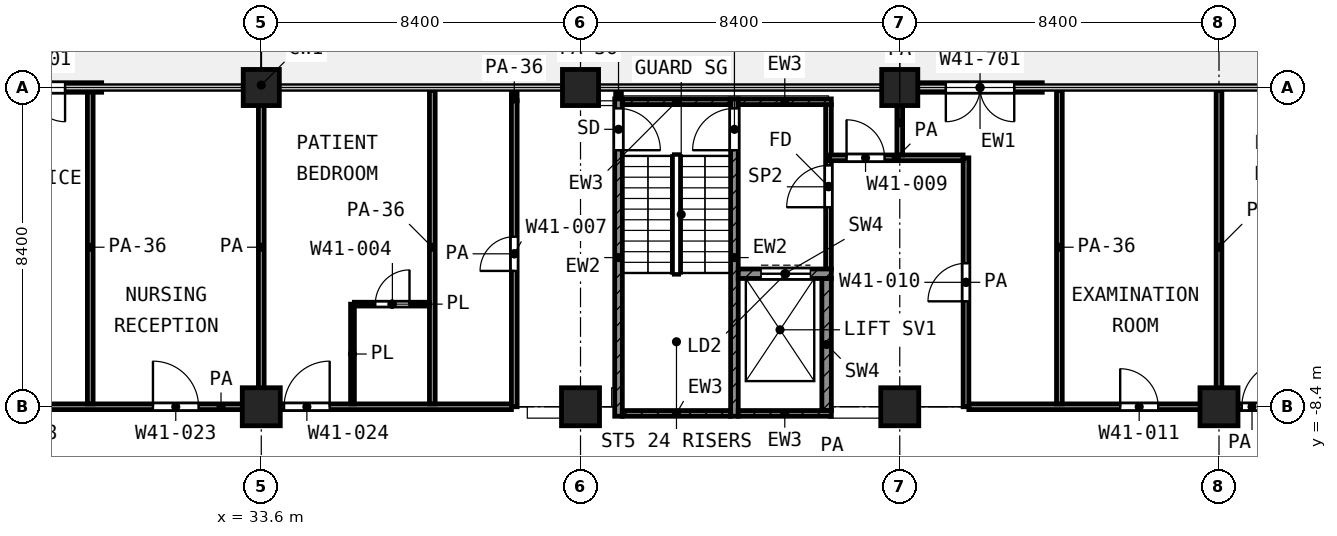
"""IFC4 building model, lengths in metres.
Left out: names, types, materials, properties, quantities, classifications, styles, units other than length and angle.
Written with IfcOpenShell. Run it as: python <this file> out.ifc"""

import sys

from ifc_helpers import new_model, si_unit, direction, frame, frame_2d, origin, origin_2d, place, context, subcontext, project, spatial, rectangle, extrude, element, fill, save


model = new_model("IFC4")
c1 = context("Model", 3, precision=1e-05, world=origin(), true_north=direction((0.0, 1.0)))
c2 = subcontext(c1, "Body", "Model", "MODEL_VIEW")
j1 = project(units=[si_unit("LENGTHUNIT", "METRE"), si_unit("PLANEANGLEUNIT", "RADIAN")], contexts=[c1])
p1 = place(None, origin())
s1 = spatial("IfcSite", under=j1, at=p1, CompositionType="ELEMENT")
p2 = place(p1, origin())
s2 = spatial("IfcBuilding", under=s1, at=p2, CompositionType="ELEMENT")
p3 = place(p2, frame((0.0, 0.0, 200.4)))
s3 = spatial("IfcBuildingStorey", under=s2, at=p3, CompositionType="ELEMENT", Elevation=200.4)
for number, where, z_axis, x_axis in (
    (1, (33.6, 0.0, 0.0), (0.0, 0.0, 1.0), (1.0, 0.0, 0.0)),
    (2, (42.0, 0.0, 0.0), (0.0, 0.0, 1.0), (1.0, 0.0, 0.0)),
    (3, (50.4, 0.0, 0.0), (0.0, 0.0, 1.0), (1.0, 0.0, 0.0)),
):
    element("IfcColumn", number, at=place(p3, frame(where, z_axis=z_axis, x_axis=x_axis)), inside=s3, PredefinedType="COLUMN", context=c2, shape_type="SweptSolid", body=[
        extrude(rectangle(XDim=0.95, YDim=0.95, at=origin_2d()), origin(), (0.0, 0.0, 1.0), 4.2),
    ])
for number, where, z_axis, x_axis in (
    (4, (33.6, -8.4, 0.0), (0.0, 0.0, 1.0), (1.0, 0.0, 0.0)),
    (5, (42.0, -8.4, 0.0), (0.0, 0.0, 1.0), (1.0, 0.0, 0.0)),
    (6, (50.4, -8.4, 0.0), (0.0, 0.0, 1.0), (1.0, 0.0, 0.0)),
    (7, (58.8, -8.4, 0.0), (0.0, 0.0, 1.0), (1.0, 0.0, 0.0)),
):
    element("IfcColumn", number, at=place(p3, frame(where, z_axis=z_axis, x_axis=x_axis)), inside=s3, PredefinedType="COLUMN", context=c2, shape_type="SweptSolid", body=[
        extrude(rectangle(XDim=1.0, YDim=1.0, at=origin_2d()), origin(), (0.0, 0.0, 1.0), 4.2),
    ])
p4 = place(p3, frame((54.15, 0.0, 0.0), z_axis=(0.0, 0.0, 1.0), x_axis=(-1.0, 0.0, 0.0)))
e8 = element("IfcWall", 8, at=p4, inside=s3, PredefinedType="SOLIDWALL", context=c2, shape_type="SweptSolid", body=[
    extrude(rectangle(XDim=3.275, YDim=0.25, at=frame_2d((1.637, 0.0))), origin(), (0.0, 0.0, 1.0), 2.58),
])
p5 = place(p4, frame((0.738, 0.0, 0.0)))
e9 = element("IfcOpeningElement", 9, at=p5, cuts=e8, PredefinedType="OPENING", context=c2, shape_type="SweptSolid", body=[
    extrude(rectangle(XDim=1.8, YDim=2.1, at=frame_2d((0.9, 1.05))), frame((0.0, 0.135, 0.0), z_axis=(0.0, -1.0, 0.0), x_axis=(1.0, 0.0, 0.0)), (0.0, 0.0, 1.0), 0.27),
])
p6 = place(p3, frame((29.4, 0.0, 0.0), z_axis=(0.0, 0.0, 1.0), x_axis=(-1.0, 0.0, 0.0)))
e10 = element("IfcWall", 10, at=p6, inside=s3, PredefinedType="SOLIDWALL", context=c2, shape_type="SweptSolid", body=[
    extrude(rectangle(XDim=3.725, YDim=0.25, at=frame_2d((1.862, 0.0))), origin(), (0.0, 0.0, 1.0), 2.58),
])
p7 = place(p6, frame((0.962, 0.0, 0.0)))
e11 = element("IfcOpeningElement", 11, at=p7, cuts=e10, PredefinedType="OPENING", context=c2, shape_type="SweptSolid", body=[
    extrude(rectangle(XDim=1.8, YDim=2.1, at=frame_2d((0.9, 1.05))), frame((0.0, 0.135, 0.0), z_axis=(0.0, -1.0, 0.0), x_axis=(1.0, 0.0, 0.0)), (0.0, 0.0, 1.0), 0.27),
])
p8 = place(p3, frame((43.0, -8.65, 0.0), z_axis=(0.0, 0.0, 1.0), x_axis=(0.0, 1.0, 0.0)))
e12 = element("IfcWall", 12, at=p8, inside=s3, PredefinedType="SHEAR", context=c2, shape_type="SweptSolid", body=[
    extrude(rectangle(XDim=8.35, YDim=0.2, at=frame_2d((4.175, 0.0))), origin(), (0.0, 0.0, 1.0), 3.6),
])
p9 = place(p8, frame((7.0, 0.0, 0.0)))
e13 = element("IfcOpeningElement", 13, at=p9, cuts=e12, PredefinedType="OPENING", context=c2, shape_type="SweptSolid", body=[
    extrude(rectangle(XDim=1.1, YDim=2.1, at=frame_2d((0.55, 1.05))), frame((0.0, 0.11, 0.0), z_axis=(0.0, -1.0, 0.0), x_axis=(1.0, 0.0, 0.0)), (0.0, 0.0, 1.0), 0.22),
])
p10 = place(p3, frame((46.05, -8.65, 0.0), z_axis=(0.0, 0.0, 1.0), x_axis=(0.0, 1.0, 0.0)))
e14 = element("IfcWall", 14, at=p10, inside=s3, PredefinedType="SHEAR", context=c2, shape_type="SweptSolid", body=[
    extrude(rectangle(XDim=8.35, YDim=0.2, at=frame_2d((4.175, 0.0))), origin(), (0.0, 0.0, 1.0), 3.6),
])
p11 = place(p10, frame((7.0, 0.0, 0.0)))
e15 = element("IfcOpeningElement", 15, at=p11, cuts=e14, PredefinedType="OPENING", context=c2, shape_type="SweptSolid", body=[
    extrude(rectangle(XDim=1.1, YDim=2.1, at=frame_2d((0.55, 1.05))), frame((0.0, 0.11, 0.0), z_axis=(0.0, -1.0, 0.0), x_axis=(1.0, 0.0, 0.0)), (0.0, 0.0, 1.0), 0.22),
])
p12 = place(p3, frame((43.1, -0.375, 0.0), z_axis=(0.0, 0.0, 1.0), x_axis=(1.0, 0.0, 0.0)))
e16 = element("IfcWall", 16, at=p12, inside=s3, PredefinedType="SHEAR", context=c2, shape_type="SweptSolid", body=[
    extrude(rectangle(XDim=2.85, YDim=0.15, at=frame_2d((1.425, 0.0))), origin(), (0.0, 0.0, 1.0), 3.6),
])
p13 = place(p3, frame((46.15, -0.375, 0.0), z_axis=(0.0, 0.0, 1.0), x_axis=(1.0, 0.0, 0.0)))
e17 = element("IfcWall", 17, at=p13, inside=s3, PredefinedType="SHEAR", context=c2, shape_type="SweptSolid", body=[
    extrude(rectangle(XDim=2.45, YDim=0.15, at=frame_2d((1.225, 0.0))), origin(), (0.0, 0.0, 1.0), 3.6),
])
p14 = place(p3, frame((43.1, -8.575, 0.0), z_axis=(0.0, 0.0, 1.0), x_axis=(1.0, 0.0, 0.0)))
e18 = element("IfcWall", 18, at=p14, inside=s3, PredefinedType="SHEAR", context=c2, shape_type="SweptSolid", body=[
    extrude(rectangle(XDim=2.85, YDim=0.15, at=frame_2d((1.425, 0.0))), origin(), (0.0, 0.0, 1.0), 3.6),
])
p15 = place(p3, frame((46.15, -8.575, 0.0), z_axis=(0.0, 0.0, 1.0), x_axis=(1.0, 0.0, 0.0)))
e19 = element("IfcWall", 19, at=p15, inside=s3, PredefinedType="SHEAR", context=c2, shape_type="SweptSolid", body=[
    extrude(rectangle(XDim=2.45, YDim=0.15, at=frame_2d((1.225, 0.0))), origin(), (0.0, 0.0, 1.0), 3.6),
])
p16 = place(p3, frame((46.15, -4.9, 0.0), z_axis=(0.0, 0.0, 1.0), x_axis=(1.0, 0.0, 0.0)))
e20 = element("IfcWall", 20, at=p16, inside=s3, PredefinedType="SHEAR", context=c2, shape_type="SweptSolid", body=[
    extrude(rectangle(XDim=2.45, YDim=0.25, at=frame_2d((1.225, 0.0))), origin(), (0.0, 0.0, 1.0), 3.6),
])
p17 = place(p16, frame((0.6, 0.0, 0.0)))
e21 = element("IfcOpeningElement", 21, at=p17, cuts=e20, PredefinedType="OPENING", context=c2, shape_type="SweptSolid", body=[
    extrude(rectangle(XDim=1.3, YDim=2.1, at=frame_2d((0.65, 1.05))), frame((0.0, 0.135, 0.0), z_axis=(0.0, -1.0, 0.0), x_axis=(1.0, 0.0, 0.0)), (0.0, 0.0, 1.0), 0.27),
])
p18 = place(p3, frame((48.475, -8.5, 0.0), z_axis=(0.0, 0.0, 1.0), x_axis=(0.0, 1.0, 0.0)))
e22 = element("IfcWall", 22, at=p18, inside=s3, PredefinedType="SHEAR", context=c2, shape_type="SweptSolid", body=[
    extrude(rectangle(XDim=3.475, YDim=0.25, at=frame_2d((1.738, 0.0))), origin(), (0.0, 0.0, 1.0), 3.6),
])
p19 = place(p3, frame((48.525, -4.775, 0.0), z_axis=(0.0, 0.0, 1.0), x_axis=(0.0, 1.0, 0.0)))
e23 = element("IfcWall", 23, at=p19, inside=s3, PredefinedType="PARTITIONING", context=c2, shape_type="SweptSolid", body=[
    extrude(rectangle(XDim=4.325, YDim=0.15, at=frame_2d((2.163, 0.0))), origin(), (0.0, 0.0, 1.0), 3.6),
])
p20 = place(p19, frame((1.625, 0.0, 0.0)))
e24 = element("IfcOpeningElement", 24, at=p20, cuts=e23, PredefinedType="OPENING", context=c2, shape_type="SweptSolid", body=[
    extrude(rectangle(XDim=1.1, YDim=2.1, at=frame_2d((0.55, 1.05))), frame((0.0, 0.085, 0.0), z_axis=(0.0, -1.0, 0.0), x_axis=(1.0, 0.0, 0.0)), (0.0, 0.0, 1.0), 0.17),
])
p21 = place(p3, frame((36.05, -5.7, 0.0), z_axis=(0.0, 0.0, 1.0), x_axis=(1.0, 0.0, 0.0)))
e25 = element("IfcWall", 25, at=p21, inside=s3, PredefinedType="PARTITIONING", context=c2, shape_type="SweptSolid", body=[
    extrude(rectangle(XDim=1.975, YDim=0.1, at=frame_2d((0.987, 0.0))), origin(), (0.0, 0.0, 1.0), 3.6),
])
p22 = place(p21, frame((0.55, 0.0, 0.0)))
e26 = element("IfcOpeningElement", 26, at=p22, cuts=e25, PredefinedType="OPENING", context=c2, shape_type="SweptSolid", body=[
    extrude(rectangle(XDim=0.9, YDim=2.1, at=frame_2d((0.45, 1.05))), frame((0.0, 0.06, 0.0), z_axis=(0.0, -1.0, 0.0), x_axis=(1.0, 0.0, 0.0)), (0.0, 0.0, 1.0), 0.12),
])
p23 = place(p3, frame((36.0, -8.325, 0.0), z_axis=(0.0, 0.0, 1.0), x_axis=(0.0, 1.0, 0.0)))
e27 = element("IfcWall", 27, at=p23, inside=s3, PredefinedType="PARTITIONING", context=c2, shape_type="SweptSolid", body=[
    extrude(rectangle(XDim=2.625, YDim=0.1, at=frame_2d((1.312, 0.0))), origin(), (0.0, 0.0, 1.0), 3.6),
])
p24 = place(p3, frame((24.9, -8.4, 0.0), z_axis=(0.0, 0.0, 1.0), x_axis=(1.0, 0.0, 0.0)))
e28 = element("IfcWall", 28, at=p24, inside=s3, PredefinedType="PARTITIONING", context=c2, shape_type="SweptSolid", body=[
    extrude(rectangle(XDim=15.282, YDim=0.15, at=frame_2d((7.641, 0.0))), origin(), (0.0, 0.0, 1.0), 3.6),
])
p25 = place(p24, frame((1.75, 0.0, 0.0)))
e29 = element("IfcOpeningElement", 29, at=p25, cuts=e28, PredefinedType="OPENING", context=c2, shape_type="SweptSolid", body=[
    extrude(rectangle(XDim=1.0, YDim=2.1, at=frame_2d((0.5, 1.05))), frame((0.0, 0.085, 0.0), z_axis=(0.0, -1.0, 0.0), x_axis=(1.0, 0.0, 0.0)), (0.0, 0.0, 1.0), 0.17),
])
p26 = place(p24, frame((5.85, 0.0, 0.0)))
e30 = element("IfcOpeningElement", 30, at=p26, cuts=e28, PredefinedType="OPENING", context=c2, shape_type="SweptSolid", body=[
    extrude(rectangle(XDim=1.2, YDim=2.1, at=frame_2d((0.6, 1.05))), frame((0.0, 0.085, 0.0), z_axis=(0.0, -1.0, 0.0), x_axis=(1.0, 0.0, 0.0)), (0.0, 0.0, 1.0), 0.17),
])
p27 = place(p24, frame((9.3, 0.0, 0.0)))
e31 = element("IfcOpeningElement", 31, at=p27, cuts=e28, PredefinedType="OPENING", context=c2, shape_type="SweptSolid", body=[
    extrude(rectangle(XDim=1.2, YDim=2.1, at=frame_2d((0.6, 1.05))), frame((0.0, 0.085, 0.0), z_axis=(0.0, -1.0, 0.0), x_axis=(1.0, 0.0, 0.0)), (0.0, 0.0, 1.0), 0.17),
])
p28 = place(p3, frame((52.218, -8.4, 0.0), z_axis=(0.0, 0.0, 1.0), x_axis=(1.0, 0.0, 0.0)))
e32 = element("IfcWall", 32, at=p28, inside=s3, PredefinedType="PARTITIONING", context=c2, shape_type="SweptSolid", body=[
    extrude(rectangle(XDim=14.902, YDim=0.15, at=frame_2d((7.451, 0.0))), origin(), (0.0, 0.0, 1.0), 3.6),
])
p29 = place(p28, frame((3.982, 0.0, 0.0)))
e33 = element("IfcOpeningElement", 33, at=p29, cuts=e32, PredefinedType="OPENING", context=c2, shape_type="SweptSolid", body=[
    extrude(rectangle(XDim=1.0, YDim=2.1, at=frame_2d((0.5, 1.05))), frame((0.0, 0.085, 0.0), z_axis=(0.0, -1.0, 0.0), x_axis=(1.0, 0.0, 0.0)), (0.0, 0.0, 1.0), 0.17),
])
p30 = place(p28, frame((7.182, 0.0, 0.0)))
e34 = element("IfcOpeningElement", 34, at=p30, cuts=e32, PredefinedType="OPENING", context=c2, shape_type="SweptSolid", body=[
    extrude(rectangle(XDim=1.2, YDim=2.1, at=frame_2d((0.6, 1.05))), frame((0.0, 0.085, 0.0), z_axis=(0.0, -1.0, 0.0), x_axis=(1.0, 0.0, 0.0)), (0.0, 0.0, 1.0), 0.17),
])
p31 = place(p28, frame((12.682, 0.0, 0.0)))
e35 = element("IfcOpeningElement", 35, at=p31, cuts=e32, PredefinedType="OPENING", context=c2, shape_type="SweptSolid", body=[
    extrude(rectangle(XDim=1.0, YDim=2.1, at=frame_2d((0.5, 1.05))), frame((0.0, 0.085, 0.0), z_axis=(0.0, -1.0, 0.0), x_axis=(1.0, 0.0, 0.0)), (0.0, 0.0, 1.0), 0.17),
])
p32 = place(p3, frame((48.55, -1.85, 0.0), z_axis=(0.0, 0.0, 1.0), x_axis=(1.0, 0.0, 0.0)))
e36 = element("IfcWall", 36, at=p32, inside=s3, PredefinedType="PARTITIONING", context=c2, shape_type="SweptSolid", body=[
    extrude(rectangle(XDim=3.516, YDim=0.15, at=frame_2d((1.758, 0.0))), origin(), (0.0, 0.0, 1.0), 3.6),
])
p33 = place(p32, frame((0.45, 0.0, 0.0)))
e37 = element("IfcOpeningElement", 37, at=p33, cuts=e36, PredefinedType="OPENING", context=c2, shape_type="SweptSolid", body=[
    extrude(rectangle(XDim=1.0, YDim=2.1, at=frame_2d((0.5, 1.05))), frame((0.0, 0.085, 0.0), z_axis=(0.0, -1.0, 0.0), x_axis=(1.0, 0.0, 0.0)), (0.0, 0.0, 1.0), 0.17),
])
p34 = place(p3, frame((29.1, -8.325, 0.0), z_axis=(0.0, 0.0, 1.0), x_axis=(0.0, 1.0, 0.0)))
e38 = element("IfcWall", 38, at=p34, inside=s3, PredefinedType="PARTITIONING", context=c2, shape_type="SweptSolid", body=[
    extrude(rectangle(XDim=8.245, YDim=0.15, at=frame_2d((4.123, 0.0))), origin(), (0.0, 0.0, 1.0), 2.7),
])
p35 = place(p3, frame((33.6, -8.325, 0.0), z_axis=(0.0, 0.0, 1.0), x_axis=(0.0, 1.0, 0.0)))
e39 = element("IfcWall", 39, at=p35, inside=s3, PredefinedType="PARTITIONING", context=c2, shape_type="SweptSolid", body=[
    extrude(rectangle(XDim=8.245, YDim=0.15, at=frame_2d((4.123, 0.0))), origin(), (0.0, 0.0, 1.0), 3.6),
])
p36 = place(p3, frame((38.1, -8.325, 0.0), z_axis=(0.0, 0.0, 1.0), x_axis=(0.0, 1.0, 0.0)))
e40 = element("IfcWall", 40, at=p36, inside=s3, PredefinedType="PARTITIONING", context=c2, shape_type="SweptSolid", body=[
    extrude(rectangle(XDim=8.245, YDim=0.15, at=frame_2d((4.123, 0.0))), origin(), (0.0, 0.0, 1.0), 2.7),
])
p37 = place(p3, frame((40.257, -8.4, 0.0), z_axis=(0.0, 0.0, 1.0), x_axis=(0.0, 1.0, 0.0)))
e41 = element("IfcWall", 41, at=p37, inside=s3, PredefinedType="PARTITIONING", context=c2, shape_type="SweptSolid", body=[
    extrude(rectangle(XDim=8.048, YDim=0.15, at=frame_2d((4.024, 0.0))), origin(), (0.0, 0.0, 1.0), 3.6),
])
p38 = place(p37, frame((3.574, 0.0, 0.0)))
e42 = element("IfcOpeningElement", 42, at=p38, cuts=e41, PredefinedType="OPENING", context=c2, shape_type="SweptSolid", body=[
    extrude(rectangle(XDim=0.9, YDim=2.1, at=frame_2d((0.45, 1.05))), frame((0.0, 0.085, 0.0), z_axis=(0.0, -1.0, 0.0), x_axis=(1.0, 0.0, 0.0)), (0.0, 0.0, 1.0), 0.17),
])
p39 = place(p3, frame((40.257, -0.35, 0.0), z_axis=(0.0, 0.0, 1.0), x_axis=(0.0, 1.0, 0.0)))
e43 = element("IfcWall", 43, at=p39, inside=s3, PredefinedType="PARTITIONING", context=c2, shape_type="SweptSolid", body=[
    extrude(rectangle(XDim=0.27, YDim=0.15, at=frame_2d((0.135, 0.0))), origin(), (0.0, 0.0, 1.0), 2.7),
])
p40 = place(p3, frame((43.0, -0.27, 0.0), z_axis=(0.0, 0.0, 1.0), x_axis=(0.0, 1.0, 0.0)))
e44 = element("IfcWall", 44, at=p40, inside=s3, PredefinedType="PARTITIONING", context=c2, shape_type="SweptSolid", body=[
    extrude(rectangle(XDim=0.19, YDim=0.15, at=frame_2d((0.095, 0.0))), origin(), (0.0, 0.0, 1.0), 2.7),
])
p41 = place(p3, frame((50.4, -1.775, 0.0), z_axis=(0.0, 0.0, 1.0), x_axis=(0.0, 1.0, 0.0)))
e45 = element("IfcWall", 45, at=p41, inside=s3, PredefinedType="PARTITIONING", context=c2, shape_type="SweptSolid", body=[
    extrude(rectangle(XDim=1.695, YDim=0.15, at=frame_2d((0.847, 0.0))), origin(), (0.0, 0.0, 1.0), 3.6),
])
p42 = place(p3, frame((52.143, -8.4, 0.0), z_axis=(0.0, 0.0, 1.0), x_axis=(0.0, 1.0, 0.0)))
e46 = element("IfcWall", 46, at=p42, inside=s3, PredefinedType="PARTITIONING", context=c2, shape_type="SweptSolid", body=[
    extrude(rectangle(XDim=6.549, YDim=0.15, at=frame_2d((3.274, 0.0))), origin(), (0.0, 0.0, 1.0), 3.6),
])
p43 = place(p42, frame((2.774, 0.0, 0.0)))
e47 = element("IfcOpeningElement", 47, at=p43, cuts=e46, PredefinedType="OPENING", context=c2, shape_type="SweptSolid", body=[
    extrude(rectangle(XDim=1.0, YDim=2.1, at=frame_2d((0.5, 1.05))), frame((0.0, 0.085, 0.0), z_axis=(0.0, -1.0, 0.0), x_axis=(1.0, 0.0, 0.0)), (0.0, 0.0, 1.0), 0.17),
])
for number, where, z_axis, x_axis in (
    (48, (54.6, -8.325, 0.0), (0.0, 0.0, 1.0), (0.0, 1.0, 0.0)),
    (49, (58.8, -8.325, 0.0), (0.0, 0.0, 1.0), (0.0, 1.0, 0.0)),
):
    element("IfcWall", number, at=place(p3, frame(where, z_axis=z_axis, x_axis=x_axis)), inside=s3, PredefinedType="PARTITIONING", context=c2, shape_type="SweptSolid", body=[
        extrude(rectangle(XDim=8.245, YDim=0.15, at=frame_2d((4.123, 0.0))), origin(), (0.0, 0.0, 1.0), 2.7),
    ])
p44 = place(p5, origin())
e50 = element("IfcDoor", 50, at=p44, inside=s3, OperationType="DOUBLE_DOOR_SINGLE_SWING", PredefinedType="DOOR", context=c2, shape_type="SweptSolid", body=[
    extrude(rectangle(XDim=1.8, YDim=2.1, at=frame_2d((0.9, 1.05))), frame((0.0, 0.025, 0.0), z_axis=(0.0, -1.0, 0.0), x_axis=(1.0, 0.0, 0.0)), (0.0, 0.0, 1.0), 0.05),
])
fill(e9, e50)
p45 = place(p7, origin())
e51 = element("IfcDoor", 51, at=p45, inside=s3, OperationType="DOUBLE_DOOR_SINGLE_SWING", PredefinedType="DOOR", context=c2, shape_type="SweptSolid", body=[
    extrude(rectangle(XDim=1.8, YDim=2.1, at=frame_2d((0.9, 1.05))), frame((0.0, 0.025, 0.0), z_axis=(0.0, -1.0, 0.0), x_axis=(1.0, 0.0, 0.0)), (0.0, 0.0, 1.0), 0.05),
])
fill(e11, e51)
p46 = place(p9, frame((1.1, 0.0, 0.0), z_axis=(0.0, 0.0, 1.0), x_axis=(-1.0, 0.0, 0.0)))
e52 = element("IfcDoor", 52, at=p46, inside=s3, OperationType="SINGLE_SWING_LEFT", PredefinedType="DOOR", context=c2, shape_type="SweptSolid", body=[
    extrude(rectangle(XDim=1.1, YDim=2.1, at=frame_2d((0.55, 1.05))), frame((0.0, 0.025, 0.0), z_axis=(0.0, -1.0, 0.0), x_axis=(1.0, 0.0, 0.0)), (0.0, 0.0, 1.0), 0.05),
])
fill(e13, e52)
p47 = place(p11, origin())
e53 = element("IfcDoor", 53, at=p47, inside=s3, OperationType="SINGLE_SWING_LEFT", PredefinedType="DOOR", context=c2, shape_type="SweptSolid", body=[
    extrude(rectangle(XDim=1.1, YDim=2.1, at=frame_2d((0.55, 1.05))), frame((0.0, 0.025, 0.0), z_axis=(0.0, -1.0, 0.0), x_axis=(1.0, 0.0, 0.0)), (0.0, 0.0, 1.0), 0.05),
])
fill(e15, e53)
p48 = place(p17, origin())
e54 = element("IfcDoor", 54, at=p48, inside=s3, OperationType="DOUBLE_DOOR_SLIDING", PredefinedType="DOOR", context=c2, shape_type="SweptSolid", body=[
    extrude(rectangle(XDim=1.3, YDim=2.1, at=frame_2d((0.65, 1.05))), frame((0.0, 0.025, 0.0), z_axis=(0.0, -1.0, 0.0), x_axis=(1.0, 0.0, 0.0)), (0.0, 0.0, 1.0), 0.05),
])
fill(e21, e54)
p49 = place(p20, origin())
e55 = element("IfcDoor", 55, at=p49, inside=s3, OperationType="SINGLE_SWING_LEFT", PredefinedType="DOOR", context=c2, shape_type="SweptSolid", body=[
    extrude(rectangle(XDim=1.1, YDim=2.1, at=frame_2d((0.55, 1.05))), frame((0.0, 0.025, 0.0), z_axis=(0.0, -1.0, 0.0), x_axis=(1.0, 0.0, 0.0)), (0.0, 0.0, 1.0), 0.05),
])
fill(e24, e55)
p50 = place(p26, origin())
e56 = element("IfcDoor", 56, at=p50, inside=s3, OperationType="SINGLE_SWING_LEFT", PredefinedType="DOOR", context=c2, shape_type="SweptSolid", body=[
    extrude(rectangle(XDim=1.2, YDim=2.1, at=frame_2d((0.6, 1.05))), frame((0.0, 0.025, 0.0), z_axis=(0.0, -1.0, 0.0), x_axis=(1.0, 0.0, 0.0)), (0.0, 0.0, 1.0), 0.05),
])
fill(e30, e56)
p51 = place(p27, origin())
e57 = element("IfcDoor", 57, at=p51, inside=s3, OperationType="SINGLE_SWING_RIGHT", PredefinedType="DOOR", context=c2, shape_type="SweptSolid", body=[
    extrude(rectangle(XDim=1.2, YDim=2.1, at=frame_2d((0.6, 1.05))), frame((0.0, 0.025, 0.0), z_axis=(0.0, -1.0, 0.0), x_axis=(1.0, 0.0, 0.0)), (0.0, 0.0, 1.0), 0.05),
])
fill(e31, e57)
p52 = place(p22, origin())
e58 = element("IfcDoor", 58, at=p52, inside=s3, OperationType="SINGLE_SWING_RIGHT", PredefinedType="DOOR", context=c2, shape_type="SweptSolid", body=[
    extrude(rectangle(XDim=0.9, YDim=2.1, at=frame_2d((0.45, 1.05))), frame((0.0, 0.025, 0.0), z_axis=(0.0, -1.0, 0.0), x_axis=(1.0, 0.0, 0.0)), (0.0, 0.0, 1.0), 0.05),
])
fill(e26, e58)
p53 = place(p33, origin())
e59 = element("IfcDoor", 59, at=p53, inside=s3, OperationType="SINGLE_SWING_LEFT", PredefinedType="DOOR", context=c2, shape_type="SweptSolid", body=[
    extrude(rectangle(XDim=1.0, YDim=2.1, at=frame_2d((0.5, 1.05))), frame((0.0, 0.025, 0.0), z_axis=(0.0, -1.0, 0.0), x_axis=(1.0, 0.0, 0.0)), (0.0, 0.0, 1.0), 0.05),
])
fill(e37, e59)
p54 = place(p43, origin())
e60 = element("IfcDoor", 60, at=p54, inside=s3, OperationType="SINGLE_SWING_LEFT", PredefinedType="DOOR", context=c2, shape_type="SweptSolid", body=[
    extrude(rectangle(XDim=1.0, YDim=2.1, at=frame_2d((0.5, 1.05))), frame((0.0, 0.025, 0.0), z_axis=(0.0, -1.0, 0.0), x_axis=(1.0, 0.0, 0.0)), (0.0, 0.0, 1.0), 0.05),
])
fill(e47, e60)
p55 = place(p29, origin())
e61 = element("IfcDoor", 61, at=p55, inside=s3, OperationType="SINGLE_SWING_LEFT", PredefinedType="DOOR", context=c2, shape_type="SweptSolid", body=[
    extrude(rectangle(XDim=1.0, YDim=2.1, at=frame_2d((0.5, 1.05))), frame((0.0, 0.025, 0.0), z_axis=(0.0, -1.0, 0.0), x_axis=(1.0, 0.0, 0.0)), (0.0, 0.0, 1.0), 0.05),
])
fill(e33, e61)
p56 = place(p30, origin())
e62 = element("IfcDoor", 62, at=p56, inside=s3, OperationType="SINGLE_SWING_RIGHT", PredefinedType="DOOR", context=c2, shape_type="SweptSolid", body=[
    extrude(rectangle(XDim=1.2, YDim=2.1, at=frame_2d((0.6, 1.05))), frame((0.0, 0.025, 0.0), z_axis=(0.0, -1.0, 0.0), x_axis=(1.0, 0.0, 0.0)), (0.0, 0.0, 1.0), 0.05),
])
fill(e34, e62)
p57 = place(p38, origin())
e63 = element("IfcDoor", 63, at=p57, inside=s3, OperationType="SINGLE_SWING_LEFT", PredefinedType="DOOR", context=c2, shape_type="SweptSolid", body=[
    extrude(rectangle(XDim=0.9, YDim=2.1, at=frame_2d((0.45, 1.05))), frame((0.0, 0.025, 0.0), z_axis=(0.0, -1.0, 0.0), x_axis=(1.0, 0.0, 0.0)), (0.0, 0.0, 1.0), 0.05),
])
fill(e42, e63)
save(model, sys.argv[1])
